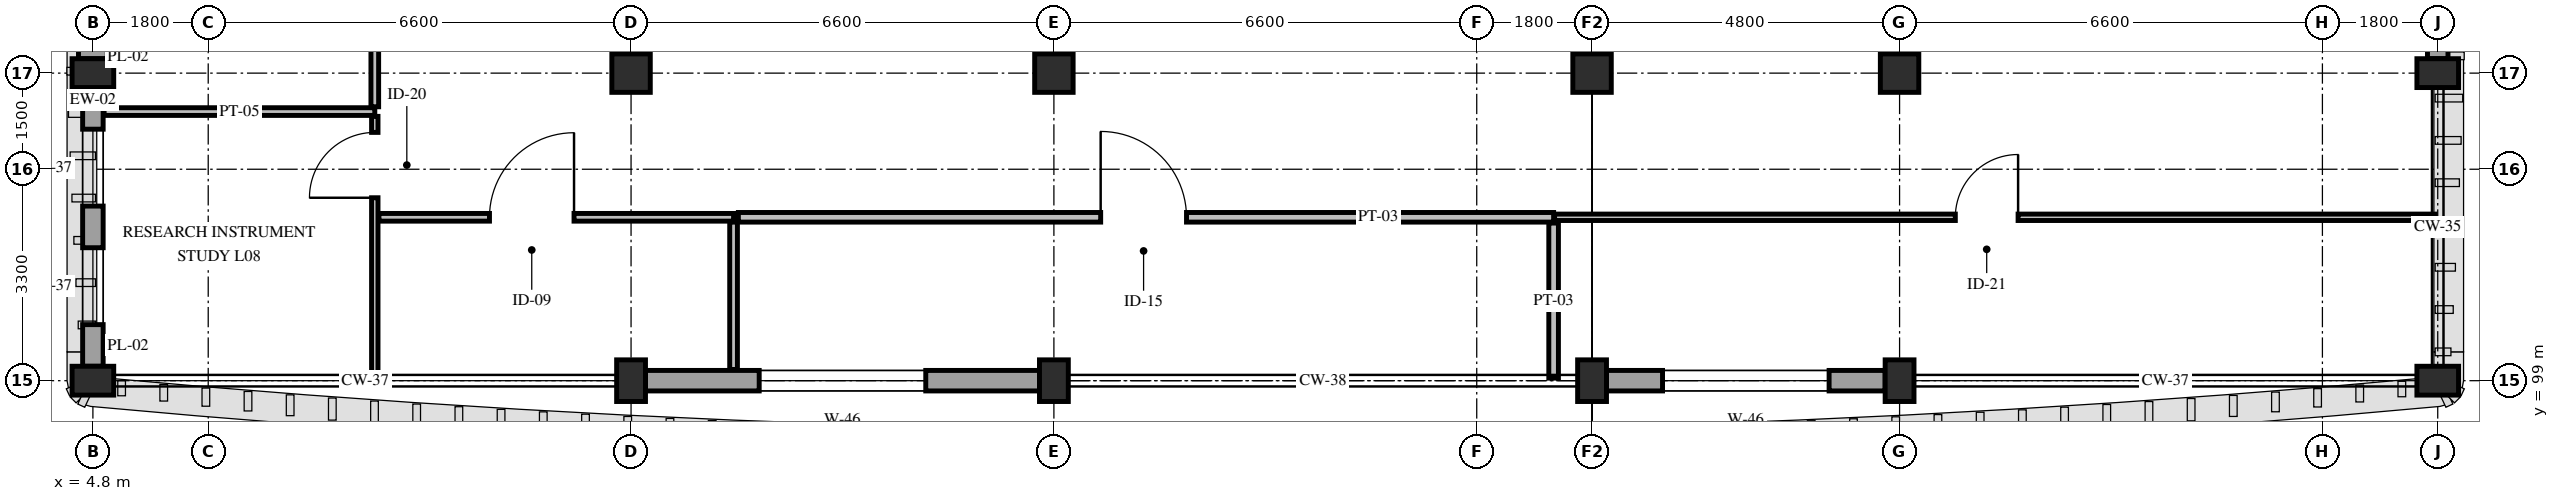
"""IFC4 building model, lengths in metres.
Left out: names, types, materials, properties, quantities, classifications, styles, units other than length and angle.
Written with IfcOpenShell. Run it as: python <this file> out.ifc"""

import sys

from ifc_helpers import new_model, si_unit, direction, frame, frame_2d, origin, origin_2d, place, context, subcontext, project, spatial, rectangle, extrude, element, fill, save


model = new_model("IFC4")
c1 = context("Model", 3, precision=1e-05, world=origin(), true_north=direction((0.0, 1.0)))
c2 = subcontext(c1, "Body", "Model", "MODEL_VIEW")
j1 = project(units=[si_unit("LENGTHUNIT", "METRE"), si_unit("PLANEANGLEUNIT", "RADIAN")], contexts=[c1])
p1 = place(None, origin())
s1 = spatial("IfcSite", under=j1, at=p1, CompositionType="ELEMENT")
p2 = place(p1, origin())
s2 = spatial("IfcBuilding", under=s1, at=p2, CompositionType="ELEMENT")
p3 = place(p2, frame((0.0, 0.0, 38.4)))
s3 = spatial("IfcBuildingStorey", under=s2, at=p3, CompositionType="ELEMENT", Elevation=38.4)
for number, where, z_axis, x_axis in (
    (1, (4.8, 99.0, 0.0), (0.0, 0.0, 1.0), (0.0, 1.0, 0.0)),
    (2, (4.8, 103.8, 0.0), (0.0, 0.0, 1.0), (0.0, 1.0, 0.0)),
    (3, (13.2, 99.0, 0.0), (0.0, 0.0, 1.0), (1.0, 0.0, 0.0)),
):
    element("IfcColumn", number, at=place(p3, frame(where, z_axis=z_axis, x_axis=x_axis)), inside=s3, PredefinedType="PILASTER", context=c2, shape_type="SweptSolid", body=[
        extrude(rectangle(XDim=0.45, YDim=0.65, at=origin_2d()), origin(), (0.0, 0.0, 1.0), 4.2),
    ])
p4 = place(p3, frame((13.2, 103.8, 0.0), z_axis=(0.0, 0.0, 1.0), x_axis=(1.0, 0.0, 0.0)))
e4 = element("IfcColumn", 4, at=p4, inside=s3, PredefinedType="COLUMN", context=c2, shape_type="SweptSolid", body=[
    extrude(rectangle(XDim=0.6, YDim=0.6, at=origin_2d()), origin(), (0.0, 0.0, 1.0), 4.2),
])
p5 = place(p3, frame((19.8, 99.0, 0.0), z_axis=(0.0, 0.0, 1.0), x_axis=(1.0, 0.0, 0.0)))
e5 = element("IfcColumn", 5, at=p5, inside=s3, PredefinedType="PILASTER", context=c2, shape_type="SweptSolid", body=[
    extrude(rectangle(XDim=0.45, YDim=0.65, at=origin_2d()), origin(), (0.0, 0.0, 1.0), 4.2),
])
p6 = place(p3, frame((19.8, 103.8, 0.0), z_axis=(0.0, 0.0, 1.0), x_axis=(1.0, 0.0, 0.0)))
e6 = element("IfcColumn", 6, at=p6, inside=s3, PredefinedType="COLUMN", context=c2, shape_type="SweptSolid", body=[
    extrude(rectangle(XDim=0.6, YDim=0.6, at=origin_2d()), origin(), (0.0, 0.0, 1.0), 4.2),
])
p7 = place(p3, frame((28.2, 99.0, 0.0), z_axis=(0.0, 0.0, 1.0), x_axis=(1.0, 0.0, 0.0)))
e7 = element("IfcColumn", 7, at=p7, inside=s3, PredefinedType="PILASTER", context=c2, shape_type="SweptSolid", body=[
    extrude(rectangle(XDim=0.45, YDim=0.65, at=origin_2d()), origin(), (0.0, 0.0, 1.0), 4.2),
])
p8 = place(p3, frame((28.2, 103.8, 0.0), z_axis=(0.0, 0.0, 1.0), x_axis=(1.0, 0.0, 0.0)))
e8 = element("IfcColumn", 8, at=p8, inside=s3, PredefinedType="COLUMN", context=c2, shape_type="SweptSolid", body=[
    extrude(rectangle(XDim=0.6, YDim=0.6, at=origin_2d()), origin(), (0.0, 0.0, 1.0), 4.2),
])
p9 = place(p3, frame((33.0, 99.0, 0.0), z_axis=(0.0, 0.0, 1.0), x_axis=(1.0, 0.0, 0.0)))
e9 = element("IfcColumn", 9, at=p9, inside=s3, PredefinedType="PILASTER", context=c2, shape_type="SweptSolid", body=[
    extrude(rectangle(XDim=0.45, YDim=0.65, at=origin_2d()), origin(), (0.0, 0.0, 1.0), 4.2),
])
p10 = place(p3, frame((33.0, 103.8, 0.0), z_axis=(0.0, 0.0, 1.0), x_axis=(1.0, 0.0, 0.0)))
e10 = element("IfcColumn", 10, at=p10, inside=s3, PredefinedType="COLUMN", context=c2, shape_type="SweptSolid", body=[
    extrude(rectangle(XDim=0.6, YDim=0.6, at=origin_2d()), origin(), (0.0, 0.0, 1.0), 4.2),
])
for number, where, z_axis, x_axis in (
    (11, (41.4, 99.0, 0.0), (0.0, 0.0, 1.0), (0.0, 1.0, 0.0)),
    (12, (41.4, 103.8, 0.0), (0.0, 0.0, 1.0), (0.0, 1.0, 0.0)),
):
    element("IfcColumn", number, at=place(p3, frame(where, z_axis=z_axis, x_axis=x_axis)), inside=s3, PredefinedType="PILASTER", context=c2, shape_type="SweptSolid", body=[
        extrude(rectangle(XDim=0.45, YDim=0.65, at=origin_2d()), origin(), (0.0, 0.0, 1.0), 4.2),
    ])
p11 = place(p3, frame((4.8, 99.225, 0.0), z_axis=(0.0, 0.0, 1.0), x_axis=(0.0, 1.0, 0.0)))
e13 = element("IfcWall", 13, at=p11, inside=s3, PredefinedType="STANDARD", context=c2, shape_type="SweptSolid", body=[
    extrude(rectangle(XDim=4.35, YDim=0.32, at=frame_2d((2.175, 0.0))), origin(), (0.0, 0.0, 1.0), 3.23),
])
p12 = place(p11, frame((0.65, 0.0, 0.85)))
e14 = element("IfcOpeningElement", 14, at=p12, cuts=e13, PredefinedType="OPENING", context=c2, shape_type="SweptSolid", body=[
    extrude(rectangle(XDim=1.2, YDim=2.08, at=frame_2d((0.6, 1.04))), frame((0.0, 0.175, 0.0), z_axis=(0.0, -1.0, 0.0), x_axis=(1.0, 0.0, 0.0)), (0.0, 0.0, 1.0), 0.35),
])
p13 = place(p11, frame((2.5, 0.0, 0.85)))
e15 = element("IfcOpeningElement", 15, at=p13, cuts=e13, PredefinedType="OPENING", context=c2, shape_type="SweptSolid", body=[
    extrude(rectangle(XDim=1.2, YDim=2.08, at=frame_2d((0.6, 1.04))), frame((0.0, 0.175, 0.0), z_axis=(0.0, -1.0, 0.0), x_axis=(1.0, 0.0, 0.0)), (0.0, 0.0, 1.0), 0.35),
])
p14 = place(p3, frame((4.8, 104.025, 0.0), z_axis=(0.0, 0.0, 1.0), x_axis=(0.0, 1.0, 0.0)))
e16 = element("IfcWall", 16, at=p14, inside=s3, PredefinedType="SOLIDWALL", context=c2, shape_type="SweptSolid", body=[
    extrude(rectangle(XDim=6.15, YDim=0.45, at=frame_2d((3.075, 0.0))), origin(), (0.0, 0.0, 1.0), 3.23),
])
p15 = place(p3, frame((41.4, 110.175, 0.0), z_axis=(0.0, 0.0, 1.0), x_axis=(0.0, -1.0, 0.0)))
e17 = element("IfcWall", 17, at=p15, inside=s3, PredefinedType="STANDARD", context=c2, shape_type="SweptSolid", body=[
    extrude(rectangle(XDim=6.15, YDim=0.32, at=frame_2d((3.075, 0.0))), origin(), (0.0, 0.0, 1.0), 3.23),
])
p16 = place(p15, frame((0.65, 0.0, 0.85)))
e18 = element("IfcOpeningElement", 18, at=p16, cuts=e17, PredefinedType="OPENING", context=c2, shape_type="SweptSolid", body=[
    extrude(rectangle(XDim=2.1, YDim=2.08, at=frame_2d((1.05, 1.04))), frame((0.0, 0.175, 0.0), z_axis=(0.0, -1.0, 0.0), x_axis=(1.0, 0.0, 0.0)), (0.0, 0.0, 1.0), 0.35),
])
p17 = place(p15, frame((3.4, 0.0, 0.85)))
e19 = element("IfcOpeningElement", 19, at=p17, cuts=e17, PredefinedType="OPENING", context=c2, shape_type="SweptSolid", body=[
    extrude(rectangle(XDim=2.1, YDim=2.08, at=frame_2d((1.05, 1.04))), frame((0.0, 0.175, 0.0), z_axis=(0.0, -1.0, 0.0), x_axis=(1.0, 0.0, 0.0)), (0.0, 0.0, 1.0), 0.35),
])
p18 = place(p3, frame((32.775, 99.0, 0.0), z_axis=(0.0, 0.0, 1.0), x_axis=(-1.0, 0.0, 0.0)))
e20 = element("IfcWall", 20, at=p18, inside=s3, PredefinedType="STANDARD", context=c2, shape_type="SweptSolid", body=[
    extrude(rectangle(XDim=4.35, YDim=0.32, at=frame_2d((2.175, 0.0))), origin(), (0.0, 0.0, 1.0), 3.35),
])
p19 = place(p18, frame((0.875, 0.0, 0.85)))
e21 = element("IfcOpeningElement", 21, at=p19, cuts=e20, PredefinedType="OPENING", context=c2, shape_type="SweptSolid", body=[
    extrude(rectangle(XDim=2.6, YDim=2.08, at=frame_2d((1.3, 1.04))), frame((0.0, 0.175, 0.0), z_axis=(0.0, -1.0, 0.0), x_axis=(1.0, 0.0, 0.0)), (0.0, 0.0, 1.0), 0.35),
])
p20 = place(p3, frame((19.575, 99.0, 0.0), z_axis=(0.0, 0.0, 1.0), x_axis=(-1.0, 0.0, 0.0)))
e22 = element("IfcWall", 22, at=p20, inside=s3, PredefinedType="STANDARD", context=c2, shape_type="SweptSolid", body=[
    extrude(rectangle(XDim=6.15, YDim=0.32, at=frame_2d((3.075, 0.0))), origin(), (0.0, 0.0, 1.0), 3.33),
])
p21 = place(p20, frame((1.775, 0.0, 0.85)))
e23 = element("IfcOpeningElement", 23, at=p21, cuts=e22, PredefinedType="OPENING", context=c2, shape_type="SweptSolid", body=[
    extrude(rectangle(XDim=2.6, YDim=2.08, at=frame_2d((1.3, 1.04))), frame((0.0, 0.175, 0.0), z_axis=(0.0, -1.0, 0.0), x_axis=(1.0, 0.0, 0.0)), (0.0, 0.0, 1.0), 0.35),
])
p22 = place(p3, frame((4.975, 103.2, 0.0), z_axis=(0.0, 0.0, 1.0), x_axis=(1.0, 0.0, 0.0)))
e24 = element("IfcWall", 24, at=p22, inside=s3, PredefinedType="PARTITIONING", context=c2, shape_type="SweptSolid", body=[
    extrude(rectangle(XDim=4.225, YDim=0.12, at=frame_2d((2.112, 0.0))), origin(), (0.0, 0.0, 1.0), 3.48),
])
p23 = place(p3, frame((9.2, 103.275, 0.0), z_axis=(0.0, 0.0, 1.0), x_axis=(0.0, 1.0, 0.0)))
e25 = element("IfcWall", 25, at=p23, inside=s3, PredefinedType="PARTITIONING", context=c2, shape_type="SweptSolid", body=[
    extrude(rectangle(XDim=7.6, YDim=0.12, at=frame_2d((3.8, 0.0))), origin(), (0.0, 0.0, 1.0), 3.23),
])
p24 = place(p23, frame((3.195, 0.0, 0.0)))
e26 = element("IfcOpeningElement", 26, at=p24, cuts=e25, PredefinedType="OPENING", context=c2, shape_type="SweptSolid", body=[
    extrude(rectangle(XDim=1.26, YDim=2.2, at=frame_2d((0.63, 1.1))), frame((0.0, 0.075, 0.0), z_axis=(0.0, -1.0, 0.0), x_axis=(1.0, 0.0, 0.0)), (0.0, 0.0, 1.0), 0.15),
])
p25 = place(p3, frame((9.2, 99.04, 0.0), z_axis=(0.0, 0.0, 1.0), x_axis=(0.0, 1.0, 0.0)))
e27 = element("IfcWall", 27, at=p25, inside=s3, PredefinedType="PARTITIONING", context=c2, shape_type="SweptSolid", body=[
    extrude(rectangle(XDim=4.085, YDim=0.1, at=frame_2d((2.042, 0.0))), origin(), (0.0, 0.0, 1.0), 3.33),
])
p26 = place(p25, frame((2.815, 0.0, 0.0)))
e28 = element("IfcOpeningElement", 28, at=p26, cuts=e27, PredefinedType="OPENING", context=c2, shape_type="SweptSolid", body=[
    extrude(rectangle(XDim=1.02, YDim=2.2, at=frame_2d((0.51, 1.1))), frame((0.0, 0.065, 0.0), z_axis=(0.0, -1.0, 0.0), x_axis=(1.0, 0.0, 0.0)), (0.0, 0.0, 1.0), 0.13),
])
p27 = place(p3, frame((9.265, 101.55, 0.0), z_axis=(0.0, 0.0, 1.0), x_axis=(1.0, 0.0, 0.0)))
e29 = element("IfcWall", 29, at=p27, inside=s3, PredefinedType="PARTITIONING", context=c2, shape_type="SweptSolid", body=[
    extrude(rectangle(XDim=5.535, YDim=0.12, at=frame_2d((2.768, 0.0))), origin(), (0.0, 0.0, 1.0), 3.53),
])
p28 = place(p27, frame((1.725, 0.0, 0.0)))
e30 = element("IfcOpeningElement", 30, at=p28, cuts=e29, PredefinedType="OPENING", context=c2, shape_type="SweptSolid", body=[
    extrude(rectangle(XDim=1.32, YDim=2.2, at=frame_2d((0.66, 1.1))), frame((0.0, 0.075, 0.0), z_axis=(0.0, -1.0, 0.0), x_axis=(1.0, 0.0, 0.0)), (0.0, 0.0, 1.0), 0.15),
])
p29 = place(p3, frame((14.8, 99.175, 0.0), z_axis=(0.0, 0.0, 1.0), x_axis=(0.0, 1.0, 0.0)))
e31 = element("IfcWall", 31, at=p29, inside=s3, PredefinedType="PARTITIONING", context=c2, shape_type="SweptSolid", body=[
    extrude(rectangle(XDim=2.3, YDim=0.12, at=frame_2d((1.15, 0.0))), origin(), (0.0, 0.0, 1.0), 3.33),
])
p30 = place(p3, frame((14.875, 101.55, 0.0), z_axis=(0.0, 0.0, 1.0), x_axis=(1.0, 0.0, 0.0)))
e32 = element("IfcWall", 32, at=p30, inside=s3, PredefinedType="PARTITIONING", context=c2, shape_type="SweptSolid", body=[
    extrude(rectangle(XDim=12.725, YDim=0.15, at=frame_2d((6.363, 0.0))), origin(), (0.0, 0.0, 1.0), 3.53),
])
p31 = place(p30, frame((5.655, 0.0, 0.0)))
e33 = element("IfcOpeningElement", 33, at=p31, cuts=e32, PredefinedType="OPENING", context=c2, shape_type="SweptSolid", body=[
    extrude(rectangle(XDim=1.34, YDim=2.2, at=frame_2d((0.67, 1.1))), frame((0.0, 0.09, 0.0), z_axis=(0.0, -1.0, 0.0), x_axis=(1.0, 0.0, 0.0)), (0.0, 0.0, 1.0), 0.18),
])
p32 = place(p3, frame((27.6, 99.04, 0.0), z_axis=(0.0, 0.0, 1.0), x_axis=(0.0, 1.0, 0.0)))
e34 = element("IfcWall", 34, at=p32, inside=s3, PredefinedType="PARTITIONING", context=c2, shape_type="SweptSolid", body=[
    extrude(rectangle(XDim=2.42, YDim=0.15, at=frame_2d((1.21, 0.0))), origin(), (0.0, 0.0, 1.0), 3.33),
])
p33 = place(p3, frame((27.615, 101.55, 0.0), z_axis=(0.0, 0.0, 1.0), x_axis=(1.0, 0.0, 0.0)))
e35 = element("IfcWall", 35, at=p33, inside=s3, PredefinedType="PARTITIONING", context=c2, shape_type="SweptSolid", body=[
    extrude(rectangle(XDim=13.745, YDim=0.1, at=frame_2d((6.873, 0.0))), origin(), (0.0, 0.0, 1.0), 3.48),
])
p34 = place(p33, frame((6.255, 0.0, 0.0)))
e36 = element("IfcOpeningElement", 36, at=p34, cuts=e35, PredefinedType="OPENING", context=c2, shape_type="SweptSolid", body=[
    extrude(rectangle(XDim=0.98, YDim=2.2, at=frame_2d((0.49, 1.1))), frame((0.0, 0.065, 0.0), z_axis=(0.0, -1.0, 0.0), x_axis=(1.0, 0.0, 0.0)), (0.0, 0.0, 1.0), 0.13),
])
p35 = place(p12, origin())
e37 = element("IfcWindow", 37, at=p35, inside=s3, PartitioningType="SINGLE_PANEL", PredefinedType="WINDOW", context=c2, shape_type="SweptSolid", body=[
    extrude(rectangle(XDim=1.2, YDim=2.08, at=frame_2d((0.6, 1.04))), frame((0.0, 0.03, 0.0), z_axis=(0.0, -1.0, 0.0), x_axis=(1.0, 0.0, 0.0)), (0.0, 0.0, 1.0), 0.06),
])
fill(e14, e37)
p36 = place(p13, origin())
e38 = element("IfcWindow", 38, at=p36, inside=s3, PartitioningType="SINGLE_PANEL", PredefinedType="WINDOW", context=c2, shape_type="SweptSolid", body=[
    extrude(rectangle(XDim=1.2, YDim=2.08, at=frame_2d((0.6, 1.04))), frame((0.0, 0.03, 0.0), z_axis=(0.0, -1.0, 0.0), x_axis=(1.0, 0.0, 0.0)), (0.0, 0.0, 1.0), 0.06),
])
fill(e15, e38)
p37 = place(p19, origin())
e39 = element("IfcWindow", 39, at=p37, inside=s3, PartitioningType="DOUBLE_PANEL_VERTICAL", PredefinedType="WINDOW", context=c2, shape_type="SweptSolid", body=[
    extrude(rectangle(XDim=2.6, YDim=2.08, at=frame_2d((1.3, 1.04))), frame((0.0, 0.03, 0.0), z_axis=(0.0, -1.0, 0.0), x_axis=(1.0, 0.0, 0.0)), (0.0, 0.0, 1.0), 0.06),
])
fill(e21, e39)
p38 = place(p21, origin())
e40 = element("IfcWindow", 40, at=p38, inside=s3, PartitioningType="DOUBLE_PANEL_VERTICAL", PredefinedType="WINDOW", context=c2, shape_type="SweptSolid", body=[
    extrude(rectangle(XDim=2.6, YDim=2.08, at=frame_2d((1.3, 1.04))), frame((0.0, 0.03, 0.0), z_axis=(0.0, -1.0, 0.0), x_axis=(1.0, 0.0, 0.0)), (0.0, 0.0, 1.0), 0.06),
])
fill(e23, e40)
p39 = place(p26, origin())
e41 = element("IfcDoor", 41, at=p39, inside=s3, OperationType="SINGLE_SWING_LEFT", PredefinedType="DOOR", context=c2, shape_type="SweptSolid", body=[
    extrude(rectangle(XDim=1.02, YDim=2.2, at=frame_2d((0.51, 1.1))), frame((0.0, 0.025, 0.0), z_axis=(0.0, -1.0, 0.0), x_axis=(1.0, 0.0, 0.0)), (0.0, 0.0, 1.0), 0.05),
])
fill(e28, e41)
p40 = place(p28, origin())
e42 = element("IfcDoor", 42, at=p40, inside=s3, OperationType="SINGLE_SWING_RIGHT", PredefinedType="DOOR", context=c2, shape_type="SweptSolid", body=[
    extrude(rectangle(XDim=1.32, YDim=2.2, at=frame_2d((0.66, 1.1))), frame((0.0, 0.025, 0.0), z_axis=(0.0, -1.0, 0.0), x_axis=(1.0, 0.0, 0.0)), (0.0, 0.0, 1.0), 0.05),
])
fill(e30, e42)
p41 = place(p31, origin())
e43 = element("IfcDoor", 43, at=p41, inside=s3, OperationType="SINGLE_SWING_LEFT", PredefinedType="DOOR", context=c2, shape_type="SweptSolid", body=[
    extrude(rectangle(XDim=1.34, YDim=2.2, at=frame_2d((0.67, 1.1))), frame((0.0, 0.025, 0.0), z_axis=(0.0, -1.0, 0.0), x_axis=(1.0, 0.0, 0.0)), (0.0, 0.0, 1.0), 0.05),
])
fill(e33, e43)
p42 = place(p34, origin())
e44 = element("IfcDoor", 44, at=p42, inside=s3, OperationType="SINGLE_SWING_RIGHT", PredefinedType="DOOR", context=c2, shape_type="SweptSolid", body=[
    extrude(rectangle(XDim=0.98, YDim=2.2, at=frame_2d((0.49, 1.1))), frame((0.0, 0.025, 0.0), z_axis=(0.0, -1.0, 0.0), x_axis=(1.0, 0.0, 0.0)), (0.0, 0.0, 1.0), 0.05),
])
fill(e36, e44)
save(model, sys.argv[1])
